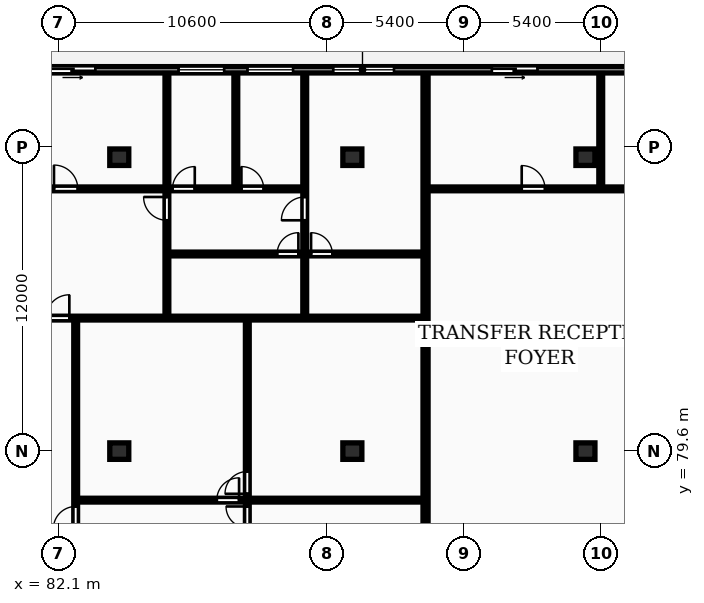
"""IFC4 building model, lengths in metres.
Left out: names, types, materials, properties, quantities, classifications, styles, units other than length and angle.
Written with IfcOpenShell. Run it as: python <this file> out.ifc"""

import sys

from ifc_helpers import new_model, si_unit, direction, frame, frame_2d, origin, origin_2d, place, context, subcontext, project, spatial, rectangle, extrude, element, fill, save


model = new_model("IFC4")
c1 = context("Model", 3, precision=1e-05, world=origin(), true_north=direction((0.0, 1.0)))
c2 = subcontext(c1, "Body", "Model", "MODEL_VIEW")
j1 = project(units=[si_unit("LENGTHUNIT", "METRE"), si_unit("PLANEANGLEUNIT", "RADIAN")], contexts=[c1])
p1 = place(None, origin())
s1 = spatial("IfcSite", under=j1, at=p1, CompositionType="ELEMENT")
p2 = place(p1, origin())
s2 = spatial("IfcBuilding", under=s1, at=p2, CompositionType="ELEMENT")
p3 = place(p2, frame((0.0, 0.0, 249.35)))
s3 = spatial("IfcBuildingStorey", under=s2, at=p3, CompositionType="ELEMENT", Elevation=249.35)
for number, where, z_axis, x_axis in (
    (1, (84.5, 79.6, 0.0), (0.0, 0.0, 1.0), (1.0, 0.0, 0.0)),
    (2, (84.5, 91.2, 0.0), (0.0, 0.0, 1.0), (1.0, 0.0, 0.0)),
    (3, (93.7, 79.6, 0.0), (0.0, 0.0, 1.0), (1.0, 0.0, 0.0)),
    (4, (93.7, 91.2, 0.0), (0.0, 0.0, 1.0), (1.0, 0.0, 0.0)),
    (5, (102.9, 79.6, 0.0), (0.0, 0.0, 1.0), (1.0, 0.0, 0.0)),
    (6, (102.9, 91.2, 0.0), (0.0, 0.0, 1.0), (1.0, 0.0, 0.0)),
):
    element("IfcColumn", number, at=place(p3, frame(where, z_axis=z_axis, x_axis=x_axis)), inside=s3, PredefinedType="COLUMN", context=c2, shape_type="SweptSolid", body=[
        extrude(rectangle(XDim=0.75, YDim=0.65, at=origin_2d()), origin(), (0.0, 0.0, 1.0), 3.45),
    ])
p4 = place(p3, frame((128.4, 94.65, 0.0), z_axis=(0.0, 0.0, 1.0), x_axis=(-1.0, 0.0, 0.0)))
e7 = element("IfcWall", 7, at=p4, inside=s3, PredefinedType="STANDARD", context=c2, shape_type="SweptSolid", body=[
    extrude(rectangle(XDim=68.6, YDim=0.25, at=frame_2d((34.3, 0.0))), origin(), (0.0, 0.0, 1.0), 3.17),
])
p5 = place(p4, frame((60.518, 0.0, 0.85)))
e8 = element("IfcOpeningElement", 8, at=p5, cuts=e7, PredefinedType="OPENING", context=c2, shape_type="SweptSolid", body=[
    extrude(rectangle(XDim=2.4, YDim=1.9, at=frame_2d((1.2, 0.95))), frame((0.0, 0.135, 0.0), z_axis=(0.0, -1.0, 0.0), x_axis=(1.0, 0.0, 0.0)), (0.0, 0.0, 1.0), 0.27),
])
p6 = place(p4, frame((55.492, 0.0, 0.85)))
e9 = element("IfcOpeningElement", 9, at=p6, cuts=e7, PredefinedType="OPENING", context=c2, shape_type="SweptSolid", body=[
    extrude(rectangle(XDim=2.4, YDim=1.9, at=frame_2d((1.2, 0.95))), frame((0.0, 0.135, 0.0), z_axis=(0.0, -1.0, 0.0), x_axis=(1.0, 0.0, 0.0)), (0.0, 0.0, 1.0), 0.27),
])
p7 = place(p4, frame((65.455, 0.0, 0.0)))
e10 = element("IfcOpeningElement", 10, at=p7, cuts=e7, PredefinedType="OPENING", context=c2, shape_type="SweptSolid", body=[
    extrude(rectangle(XDim=1.8, YDim=2.2, at=frame_2d((0.9, 1.1))), frame((0.0, 0.135, 0.0), z_axis=(0.0, -1.0, 0.0), x_axis=(1.0, 0.0, 0.0)), (0.0, 0.0, 1.0), 0.27),
])
p8 = place(p4, frame((50.746, 0.0, 0.85)))
e11 = element("IfcOpeningElement", 11, at=p8, cuts=e7, PredefinedType="OPENING", context=c2, shape_type="SweptSolid", body=[
    extrude(rectangle(XDim=2.4, YDim=1.9, at=frame_2d((1.2, 0.95))), frame((0.0, 0.135, 0.0), z_axis=(0.0, -1.0, 0.0), x_axis=(1.0, 0.0, 0.0)), (0.0, 0.0, 1.0), 0.27),
])
p9 = place(p4, frame((39.76, 0.0, 0.85)))
e12 = element("IfcOpeningElement", 12, at=p9, cuts=e7, PredefinedType="OPENING", context=c2, shape_type="SweptSolid", body=[
    extrude(rectangle(XDim=1.8, YDim=1.8, at=frame_2d((0.9, 0.9))), frame((0.0, 0.135, 0.0), z_axis=(0.0, -1.0, 0.0), x_axis=(1.0, 0.0, 0.0)), (0.0, 0.0, 1.0), 0.27),
])
p10 = place(p4, frame((37.04, 0.0, 0.85)))
e13 = element("IfcOpeningElement", 13, at=p10, cuts=e7, PredefinedType="OPENING", context=c2, shape_type="SweptSolid", body=[
    extrude(rectangle(XDim=1.8, YDim=1.8, at=frame_2d((0.9, 0.9))), frame((0.0, 0.135, 0.0), z_axis=(0.0, -1.0, 0.0), x_axis=(1.0, 0.0, 0.0)), (0.0, 0.0, 1.0), 0.27),
])
p11 = place(p4, frame((44.845, 0.0, 0.0)))
e14 = element("IfcOpeningElement", 14, at=p11, cuts=e7, PredefinedType="OPENING", context=c2, shape_type="SweptSolid", body=[
    extrude(rectangle(XDim=1.8, YDim=2.2, at=frame_2d((0.9, 1.1))), frame((0.0, 0.135, 0.0), z_axis=(0.0, -1.0, 0.0), x_axis=(1.0, 0.0, 0.0)), (0.0, 0.0, 1.0), 0.27),
])
p12 = place(p4, frame((33.056, 0.0, 0.85)))
e15 = element("IfcOpeningElement", 15, at=p12, cuts=e7, PredefinedType="OPENING", context=c2, shape_type="SweptSolid", body=[
    extrude(rectangle(XDim=2.4, YDim=1.9, at=frame_2d((1.2, 0.95))), frame((0.0, 0.135, 0.0), z_axis=(0.0, -1.0, 0.0), x_axis=(1.0, 0.0, 0.0)), (0.0, 0.0, 1.0), 0.27),
])
p13 = place(p4, frame((27.394, 0.0, 0.0)))
e16 = element("IfcOpeningElement", 16, at=p13, cuts=e7, PredefinedType="OPENING", context=c2, shape_type="SweptSolid", body=[
    extrude(rectangle(XDim=1.8, YDim=2.2, at=frame_2d((0.9, 1.1))), frame((0.0, 0.135, 0.0), z_axis=(0.0, -1.0, 0.0), x_axis=(1.0, 0.0, 0.0)), (0.0, 0.0, 1.0), 0.27),
])
p14 = place(p4, frame((18.879, 0.0, 0.85)))
e17 = element("IfcOpeningElement", 17, at=p14, cuts=e7, PredefinedType="OPENING", context=c2, shape_type="SweptSolid", body=[
    extrude(rectangle(XDim=2.4, YDim=1.9, at=frame_2d((1.2, 0.95))), frame((0.0, 0.135, 0.0), z_axis=(0.0, -1.0, 0.0), x_axis=(1.0, 0.0, 0.0)), (0.0, 0.0, 1.0), 0.27),
])
p15 = place(p4, frame((11.048, 0.0, 0.0)))
e18 = element("IfcOpeningElement", 18, at=p15, cuts=e7, PredefinedType="OPENING", context=c2, shape_type="SweptSolid", body=[
    extrude(rectangle(XDim=1.8, YDim=2.2, at=frame_2d((0.9, 1.1))), frame((0.0, 0.135, 0.0), z_axis=(0.0, -1.0, 0.0), x_axis=(1.0, 0.0, 0.0)), (0.0, 0.0, 1.0), 0.27),
])
p16 = place(p4, frame((3.298, 0.0, 0.85)))
e19 = element("IfcOpeningElement", 19, at=p16, cuts=e7, PredefinedType="OPENING", context=c2, shape_type="SweptSolid", body=[
    extrude(rectangle(XDim=2.4, YDim=1.9, at=frame_2d((1.2, 0.95))), frame((0.0, 0.135, 0.0), z_axis=(0.0, -1.0, 0.0), x_axis=(1.0, 0.0, 0.0)), (0.0, 0.0, 1.0), 0.27),
])
p17 = place(p3, frame((96.589, 70.18, 0.0), z_axis=(0.0, 0.0, 1.0), x_axis=(0.0, 1.0, 0.0)))
e20 = element("IfcWall", 20, at=p17, inside=s3, PredefinedType="PARTITIONING", context=c2, shape_type="SweptSolid", body=[
    extrude(rectangle(XDim=24.32, YDim=0.2, at=frame_2d((12.16, 0.0))), origin(), (0.0, 0.0, 1.0), 3.17),
])
p18 = place(p3, frame((89.554, 70.16, 0.0), z_axis=(0.0, 0.0, 1.0), x_axis=(0.0, 1.0, 0.0)))
e21 = element("IfcWall", 21, at=p18, inside=s3, PredefinedType="PARTITIONING", context=c2, shape_type="SweptSolid", body=[
    extrude(rectangle(XDim=14.65, YDim=0.15, at=frame_2d((7.325, 0.0))), origin(), (0.0, 0.0, 1.0), 3.17),
])
p19 = place(p18, frame((6.415, 0.0, 0.0)))
e22 = element("IfcOpeningElement", 22, at=p19, cuts=e21, PredefinedType="OPENING", context=c2, shape_type="SweptSolid", body=[
    extrude(rectangle(XDim=0.84, YDim=2.04, at=frame_2d((0.42, 1.02))), frame((0.0, 0.085, 0.0), z_axis=(0.0, -1.0, 0.0), x_axis=(1.0, 0.0, 0.0)), (0.0, 0.0, 1.0), 0.17),
])
p20 = place(p18, frame((7.755, 0.0, 0.0)))
e23 = element("IfcOpeningElement", 23, at=p20, cuts=e21, PredefinedType="OPENING", context=c2, shape_type="SweptSolid", body=[
    extrude(rectangle(XDim=0.88, YDim=2.06, at=frame_2d((0.44, 1.03))), frame((0.0, 0.085, 0.0), z_axis=(0.0, -1.0, 0.0), x_axis=(1.0, 0.0, 0.0)), (0.0, 0.0, 1.0), 0.17),
])
p21 = place(p3, frame((82.839, 77.665, 0.0), z_axis=(0.0, 0.0, 1.0), x_axis=(1.0, 0.0, 0.0)))
e24 = element("IfcWall", 24, at=p21, inside=s3, PredefinedType="PARTITIONING", context=c2, shape_type="SweptSolid", body=[
    extrude(rectangle(XDim=13.669, YDim=0.15, at=frame_2d((6.835, 0.0))), origin(), (0.0, 0.0, 1.0), 3.17),
])
p22 = place(p21, frame((5.51, 0.0, 0.0)))
e25 = element("IfcOpeningElement", 25, at=p22, cuts=e24, PredefinedType="OPENING", context=c2, shape_type="SweptSolid", body=[
    extrude(rectangle(XDim=0.88, YDim=2.06, at=frame_2d((0.44, 1.03))), frame((0.0, 0.085, 0.0), z_axis=(0.0, -1.0, 0.0), x_axis=(1.0, 0.0, 0.0)), (0.0, 0.0, 1.0), 0.17),
])
p23 = place(p3, frame((82.779, 70.16, 0.0), z_axis=(0.0, 0.0, 1.0), x_axis=(0.0, 1.0, 0.0)))
e26 = element("IfcWall", 26, at=p23, inside=s3, PredefinedType="PARTITIONING", context=c2, shape_type="SweptSolid", body=[
    extrude(rectangle(XDim=14.65, YDim=0.15, at=frame_2d((7.325, 0.0))), origin(), (0.0, 0.0, 1.0), 3.17),
])
p24 = place(p23, frame((6.375, 0.0, 0.0)))
e27 = element("IfcOpeningElement", 27, at=p24, cuts=e26, PredefinedType="OPENING", context=c2, shape_type="SweptSolid", body=[
    extrude(rectangle(XDim=0.88, YDim=2.06, at=frame_2d((0.44, 1.03))), frame((0.0, 0.085, 0.0), z_axis=(0.0, -1.0, 0.0), x_axis=(1.0, 0.0, 0.0)), (0.0, 0.0, 1.0), 0.17),
])
p25 = place(p3, frame((89.1, 90.03, 0.0), z_axis=(0.0, 0.0, 1.0), x_axis=(0.0, 1.0, 0.0)))
e28 = element("IfcWall", 28, at=p25, inside=s3, PredefinedType="PARTITIONING", context=c2, shape_type="SweptSolid", body=[
    extrude(rectangle(XDim=4.47, YDim=0.15, at=frame_2d((2.235, 0.0))), origin(), (0.0, 0.0, 1.0), 3.17),
])
p26 = place(p3, frame((86.38, 84.89, 0.0), z_axis=(0.0, 0.0, 1.0), x_axis=(0.0, 1.0, 0.0)))
e29 = element("IfcWall", 29, at=p26, inside=s3, PredefinedType="PARTITIONING", context=c2, shape_type="SweptSolid", body=[
    extrude(rectangle(XDim=9.61, YDim=0.15, at=frame_2d((4.805, 0.0))), origin(), (0.0, 0.0, 1.0), 3.17),
])
p27 = place(p26, frame((3.82, 0.0, 0.0)))
e30 = element("IfcOpeningElement", 30, at=p27, cuts=e29, PredefinedType="OPENING", context=c2, shape_type="SweptSolid", body=[
    extrude(rectangle(XDim=0.92, YDim=2.08, at=frame_2d((0.46, 1.04))), frame((0.0, 0.085, 0.0), z_axis=(0.0, -1.0, 0.0), x_axis=(1.0, 0.0, 0.0)), (0.0, 0.0, 1.0), 0.17),
])
p28 = place(p3, frame((91.82, 84.89, 0.0), z_axis=(0.0, 0.0, 1.0), x_axis=(0.0, 1.0, 0.0)))
e31 = element("IfcWall", 31, at=p28, inside=s3, PredefinedType="PARTITIONING", context=c2, shape_type="SweptSolid", body=[
    extrude(rectangle(XDim=2.47, YDim=0.15, at=frame_2d((1.235, 0.0))), origin(), (0.0, 0.0, 1.0), 3.17),
])
p29 = place(p3, frame((91.82, 87.4, 0.0), z_axis=(0.0, 0.0, 1.0), x_axis=(0.0, 1.0, 0.0)))
e32 = element("IfcWall", 32, at=p29, inside=s3, PredefinedType="PARTITIONING", context=c2, shape_type="SweptSolid", body=[
    extrude(rectangle(XDim=7.1, YDim=0.15, at=frame_2d((3.55, 0.0))), origin(), (0.0, 0.0, 1.0), 3.17),
])
p30 = place(p29, frame((1.31, 0.0, 0.0)))
e33 = element("IfcOpeningElement", 33, at=p30, cuts=e32, PredefinedType="OPENING", context=c2, shape_type="SweptSolid", body=[
    extrude(rectangle(XDim=0.92, YDim=2.08, at=frame_2d((0.46, 1.04))), frame((0.0, 0.085, 0.0), z_axis=(0.0, -1.0, 0.0), x_axis=(1.0, 0.0, 0.0)), (0.0, 0.0, 1.0), 0.17),
])
p31 = place(p3, frame((86.42, 87.38, 0.0), z_axis=(0.0, 0.0, 1.0), x_axis=(1.0, 0.0, 0.0)))
e34 = element("IfcWall", 34, at=p31, inside=s3, PredefinedType="PARTITIONING", context=c2, shape_type="SweptSolid", body=[
    extrude(rectangle(XDim=10.089, YDim=0.15, at=frame_2d((5.044, 0.0))), origin(), (0.0, 0.0, 1.0), 3.17),
])
p32 = place(p31, frame((4.31, 0.0, 0.0)))
e35 = element("IfcOpeningElement", 35, at=p32, cuts=e34, PredefinedType="OPENING", context=c2, shape_type="SweptSolid", body=[
    extrude(rectangle(XDim=0.84, YDim=2.04, at=frame_2d((0.42, 1.02))), frame((0.0, 0.085, 0.0), z_axis=(0.0, -1.0, 0.0), x_axis=(1.0, 0.0, 0.0)), (0.0, 0.0, 1.0), 0.17),
])
p33 = place(p31, frame((5.65, 0.0, 0.0)))
e36 = element("IfcOpeningElement", 36, at=p33, cuts=e34, PredefinedType="OPENING", context=c2, shape_type="SweptSolid", body=[
    extrude(rectangle(XDim=0.84, YDim=2.04, at=frame_2d((0.42, 1.02))), frame((0.0, 0.085, 0.0), z_axis=(0.0, -1.0, 0.0), x_axis=(1.0, 0.0, 0.0)), (0.0, 0.0, 1.0), 0.17),
])
p34 = place(p3, frame((78.889, 84.85, 0.0), z_axis=(0.0, 0.0, 1.0), x_axis=(1.0, 0.0, 0.0)))
e37 = element("IfcWall", 37, at=p34, inside=s3, PredefinedType="PARTITIONING", context=c2, shape_type="SweptSolid", body=[
    extrude(rectangle(XDim=17.619, YDim=0.15, at=frame_2d((8.81, 0.0))), origin(), (0.0, 0.0, 1.0), 3.17),
])
p35 = place(p34, frame((2.72, 0.0, 0.0)))
e38 = element("IfcOpeningElement", 38, at=p35, cuts=e37, PredefinedType="OPENING", context=c2, shape_type="SweptSolid", body=[
    extrude(rectangle(XDim=0.92, YDim=2.08, at=frame_2d((0.46, 1.04))), frame((0.0, 0.085, 0.0), z_axis=(0.0, -1.0, 0.0), x_axis=(1.0, 0.0, 0.0)), (0.0, 0.0, 1.0), 0.17),
])
p36 = place(p3, frame((78.889, 89.95, 0.0), z_axis=(0.0, 0.0, 1.0), x_axis=(1.0, 0.0, 0.0)))
e39 = element("IfcWall", 39, at=p36, inside=s3, PredefinedType="PARTITIONING", context=c2, shape_type="SweptSolid", body=[
    extrude(rectangle(XDim=12.931, YDim=0.15, at=frame_2d((6.465, 0.0))), origin(), (0.0, 0.0, 1.0), 3.17),
])
p37 = place(p36, frame((3.033, 0.0, 0.0)))
e40 = element("IfcOpeningElement", 40, at=p37, cuts=e39, PredefinedType="OPENING", context=c2, shape_type="SweptSolid", body=[
    extrude(rectangle(XDim=0.94, YDim=2.1, at=frame_2d((0.47, 1.05))), frame((0.0, 0.085, 0.0), z_axis=(0.0, -1.0, 0.0), x_axis=(1.0, 0.0, 0.0)), (0.0, 0.0, 1.0), 0.17),
])
p38 = place(p36, frame((7.711, 0.0, 0.0)))
e41 = element("IfcOpeningElement", 41, at=p38, cuts=e39, PredefinedType="OPENING", context=c2, shape_type="SweptSolid", body=[
    extrude(rectangle(XDim=0.88, YDim=2.06, at=frame_2d((0.44, 1.03))), frame((0.0, 0.085, 0.0), z_axis=(0.0, -1.0, 0.0), x_axis=(1.0, 0.0, 0.0)), (0.0, 0.0, 1.0), 0.17),
])
p39 = place(p36, frame((10.431, 0.0, 0.0)))
e42 = element("IfcOpeningElement", 42, at=p39, cuts=e39, PredefinedType="OPENING", context=c2, shape_type="SweptSolid", body=[
    extrude(rectangle(XDim=0.88, YDim=2.06, at=frame_2d((0.44, 1.03))), frame((0.0, 0.085, 0.0), z_axis=(0.0, -1.0, 0.0), x_axis=(1.0, 0.0, 0.0)), (0.0, 0.0, 1.0), 0.17),
])
p40 = place(p3, frame((103.504, 90.03, 0.0), z_axis=(0.0, 0.0, 1.0), x_axis=(0.0, 1.0, 0.0)))
e43 = element("IfcWall", 43, at=p40, inside=s3, PredefinedType="PARTITIONING", context=c2, shape_type="SweptSolid", body=[
    extrude(rectangle(XDim=4.47, YDim=0.15, at=frame_2d((2.235, 0.0))), origin(), (0.0, 0.0, 1.0), 3.17),
])
p41 = place(p3, frame((96.669, 89.95, 0.0), z_axis=(0.0, 0.0, 1.0), x_axis=(1.0, 0.0, 0.0)))
e44 = element("IfcWall", 44, at=p41, inside=s3, PredefinedType="PARTITIONING", context=c2, shape_type="SweptSolid", body=[
    extrude(rectangle(XDim=16.51, YDim=0.15, at=frame_2d((8.255, 0.0))), origin(), (0.0, 0.0, 1.0), 3.17),
])
p42 = place(p41, frame((3.716, 0.0, 0.0)))
e45 = element("IfcOpeningElement", 45, at=p42, cuts=e44, PredefinedType="OPENING", context=c2, shape_type="SweptSolid", body=[
    extrude(rectangle(XDim=0.92, YDim=2.08, at=frame_2d((0.46, 1.04))), frame((0.0, 0.085, 0.0), z_axis=(0.0, -1.0, 0.0), x_axis=(1.0, 0.0, 0.0)), (0.0, 0.0, 1.0), 0.17),
])
p43 = place(p41, frame((7.795, 0.0, 0.0)))
e46 = element("IfcOpeningElement", 46, at=p43, cuts=e44, PredefinedType="OPENING", context=c2, shape_type="SweptSolid", body=[
    extrude(rectangle(XDim=0.92, YDim=2.08, at=frame_2d((0.46, 1.04))), frame((0.0, 0.085, 0.0), z_axis=(0.0, -1.0, 0.0), x_axis=(1.0, 0.0, 0.0)), (0.0, 0.0, 1.0), 0.17),
])
p44 = place(p9, origin())
e47 = element("IfcWindow", 47, at=p44, inside=s3, PartitioningType="SINGLE_PANEL", PredefinedType="WINDOW", context=c2, shape_type="SweptSolid", body=[
    extrude(rectangle(XDim=1.8, YDim=1.8, at=frame_2d((0.9, 0.9))), frame((0.0, 0.03, 0.0), z_axis=(0.0, -1.0, 0.0), x_axis=(1.0, 0.0, 0.0)), (0.0, 0.0, 1.0), 0.06),
])
fill(e12, e47)
p45 = place(p10, origin())
e48 = element("IfcWindow", 48, at=p45, inside=s3, PartitioningType="SINGLE_PANEL", PredefinedType="WINDOW", context=c2, shape_type="SweptSolid", body=[
    extrude(rectangle(XDim=1.8, YDim=1.8, at=frame_2d((0.9, 0.9))), frame((0.0, 0.03, 0.0), z_axis=(0.0, -1.0, 0.0), x_axis=(1.0, 0.0, 0.0)), (0.0, 0.0, 1.0), 0.06),
])
fill(e13, e48)
p46 = place(p11, origin())
e49 = element("IfcDoor", 49, at=p46, inside=s3, OperationType="SLIDING_TO_LEFT", PredefinedType="DOOR", context=c2, shape_type="SweptSolid", body=[
    extrude(rectangle(XDim=1.8, YDim=2.2, at=frame_2d((0.9, 1.1))), frame((0.0, 0.025, 0.0), z_axis=(0.0, -1.0, 0.0), x_axis=(1.0, 0.0, 0.0)), (0.0, 0.0, 1.0), 0.05),
])
fill(e14, e49)
p47 = place(p12, origin())
e50 = element("IfcWindow", 50, at=p47, inside=s3, PartitioningType="DOUBLE_PANEL_VERTICAL", PredefinedType="WINDOW", context=c2, shape_type="SweptSolid", body=[
    extrude(rectangle(XDim=2.4, YDim=1.9, at=frame_2d((1.2, 0.95))), frame((0.0, 0.03, 0.0), z_axis=(0.0, -1.0, 0.0), x_axis=(1.0, 0.0, 0.0)), (0.0, 0.0, 1.0), 0.06),
])
fill(e15, e50)
p48 = place(p13, origin())
e51 = element("IfcDoor", 51, at=p48, inside=s3, OperationType="SLIDING_TO_LEFT", PredefinedType="DOOR", context=c2, shape_type="SweptSolid", body=[
    extrude(rectangle(XDim=1.8, YDim=2.2, at=frame_2d((0.9, 1.1))), frame((0.0, 0.025, 0.0), z_axis=(0.0, -1.0, 0.0), x_axis=(1.0, 0.0, 0.0)), (0.0, 0.0, 1.0), 0.05),
])
fill(e16, e51)
p49 = place(p19, origin())
e52 = element("IfcDoor", 52, at=p49, inside=s3, OperationType="SINGLE_SWING_RIGHT", PredefinedType="DOOR", context=c2, shape_type="SweptSolid", body=[
    extrude(rectangle(XDim=0.84, YDim=2.04, at=frame_2d((0.42, 1.02))), frame((0.0, 0.025, 0.0), z_axis=(0.0, -1.0, 0.0), x_axis=(1.0, 0.0, 0.0)), (0.0, 0.0, 1.0), 0.05),
])
fill(e22, e52)
p50 = place(p20, origin())
e53 = element("IfcDoor", 53, at=p50, inside=s3, OperationType="SINGLE_SWING_LEFT", PredefinedType="DOOR", context=c2, shape_type="SweptSolid", body=[
    extrude(rectangle(XDim=0.88, YDim=2.06, at=frame_2d((0.44, 1.03))), frame((0.0, 0.025, 0.0), z_axis=(0.0, -1.0, 0.0), x_axis=(1.0, 0.0, 0.0)), (0.0, 0.0, 1.0), 0.05),
])
fill(e23, e53)
p51 = place(p22, origin())
e54 = element("IfcDoor", 54, at=p51, inside=s3, OperationType="SINGLE_SWING_RIGHT", PredefinedType="DOOR", context=c2, shape_type="SweptSolid", body=[
    extrude(rectangle(XDim=0.88, YDim=2.06, at=frame_2d((0.44, 1.03))), frame((0.0, 0.025, 0.0), z_axis=(0.0, -1.0, 0.0), x_axis=(1.0, 0.0, 0.0)), (0.0, 0.0, 1.0), 0.05),
])
fill(e25, e54)
p52 = place(p24, origin())
e55 = element("IfcDoor", 55, at=p52, inside=s3, OperationType="SINGLE_SWING_LEFT", PredefinedType="DOOR", context=c2, shape_type="SweptSolid", body=[
    extrude(rectangle(XDim=0.88, YDim=2.06, at=frame_2d((0.44, 1.03))), frame((0.0, 0.025, 0.0), z_axis=(0.0, -1.0, 0.0), x_axis=(1.0, 0.0, 0.0)), (0.0, 0.0, 1.0), 0.05),
])
fill(e27, e55)
p53 = place(p27, origin())
e56 = element("IfcDoor", 56, at=p53, inside=s3, OperationType="SINGLE_SWING_RIGHT", PredefinedType="DOOR", context=c2, shape_type="SweptSolid", body=[
    extrude(rectangle(XDim=0.92, YDim=2.08, at=frame_2d((0.46, 1.04))), frame((0.0, 0.025, 0.0), z_axis=(0.0, -1.0, 0.0), x_axis=(1.0, 0.0, 0.0)), (0.0, 0.0, 1.0), 0.05),
])
fill(e30, e56)
p54 = place(p30, origin())
e57 = element("IfcDoor", 57, at=p54, inside=s3, OperationType="SINGLE_SWING_LEFT", PredefinedType="DOOR", context=c2, shape_type="SweptSolid", body=[
    extrude(rectangle(XDim=0.92, YDim=2.08, at=frame_2d((0.46, 1.04))), frame((0.0, 0.025, 0.0), z_axis=(0.0, -1.0, 0.0), x_axis=(1.0, 0.0, 0.0)), (0.0, 0.0, 1.0), 0.05),
])
fill(e33, e57)
p55 = place(p32, origin())
e58 = element("IfcDoor", 58, at=p55, inside=s3, OperationType="SINGLE_SWING_RIGHT", PredefinedType="DOOR", context=c2, shape_type="SweptSolid", body=[
    extrude(rectangle(XDim=0.84, YDim=2.04, at=frame_2d((0.42, 1.02))), frame((0.0, 0.025, 0.0), z_axis=(0.0, -1.0, 0.0), x_axis=(1.0, 0.0, 0.0)), (0.0, 0.0, 1.0), 0.05),
])
fill(e35, e58)
p56 = place(p33, origin())
e59 = element("IfcDoor", 59, at=p56, inside=s3, OperationType="SINGLE_SWING_LEFT", PredefinedType="DOOR", context=c2, shape_type="SweptSolid", body=[
    extrude(rectangle(XDim=0.84, YDim=2.04, at=frame_2d((0.42, 1.02))), frame((0.0, 0.025, 0.0), z_axis=(0.0, -1.0, 0.0), x_axis=(1.0, 0.0, 0.0)), (0.0, 0.0, 1.0), 0.05),
])
fill(e36, e59)
p57 = place(p35, origin())
e60 = element("IfcDoor", 60, at=p57, inside=s3, OperationType="SINGLE_SWING_RIGHT", PredefinedType="DOOR", context=c2, shape_type="SweptSolid", body=[
    extrude(rectangle(XDim=0.92, YDim=2.08, at=frame_2d((0.46, 1.04))), frame((0.0, 0.025, 0.0), z_axis=(0.0, -1.0, 0.0), x_axis=(1.0, 0.0, 0.0)), (0.0, 0.0, 1.0), 0.05),
])
fill(e38, e60)
p58 = place(p37, origin())
e61 = element("IfcDoor", 61, at=p58, inside=s3, OperationType="SINGLE_SWING_LEFT", PredefinedType="DOOR", context=c2, shape_type="SweptSolid", body=[
    extrude(rectangle(XDim=0.94, YDim=2.1, at=frame_2d((0.47, 1.05))), frame((0.0, 0.025, 0.0), z_axis=(0.0, -1.0, 0.0), x_axis=(1.0, 0.0, 0.0)), (0.0, 0.0, 1.0), 0.05),
])
fill(e40, e61)
p59 = place(p38, origin())
e62 = element("IfcDoor", 62, at=p59, inside=s3, OperationType="SINGLE_SWING_RIGHT", PredefinedType="DOOR", context=c2, shape_type="SweptSolid", body=[
    extrude(rectangle(XDim=0.88, YDim=2.06, at=frame_2d((0.44, 1.03))), frame((0.0, 0.025, 0.0), z_axis=(0.0, -1.0, 0.0), x_axis=(1.0, 0.0, 0.0)), (0.0, 0.0, 1.0), 0.05),
])
fill(e41, e62)
p60 = place(p39, origin())
e63 = element("IfcDoor", 63, at=p60, inside=s3, OperationType="SINGLE_SWING_LEFT", PredefinedType="DOOR", context=c2, shape_type="SweptSolid", body=[
    extrude(rectangle(XDim=0.88, YDim=2.06, at=frame_2d((0.44, 1.03))), frame((0.0, 0.025, 0.0), z_axis=(0.0, -1.0, 0.0), x_axis=(1.0, 0.0, 0.0)), (0.0, 0.0, 1.0), 0.05),
])
fill(e42, e63)
p61 = place(p42, origin())
e64 = element("IfcDoor", 64, at=p61, inside=s3, OperationType="SINGLE_SWING_LEFT", PredefinedType="DOOR", context=c2, shape_type="SweptSolid", body=[
    extrude(rectangle(XDim=0.92, YDim=2.08, at=frame_2d((0.46, 1.04))), frame((0.0, 0.025, 0.0), z_axis=(0.0, -1.0, 0.0), x_axis=(1.0, 0.0, 0.0)), (0.0, 0.0, 1.0), 0.05),
])
fill(e45, e64)
save(model, sys.argv[1])
